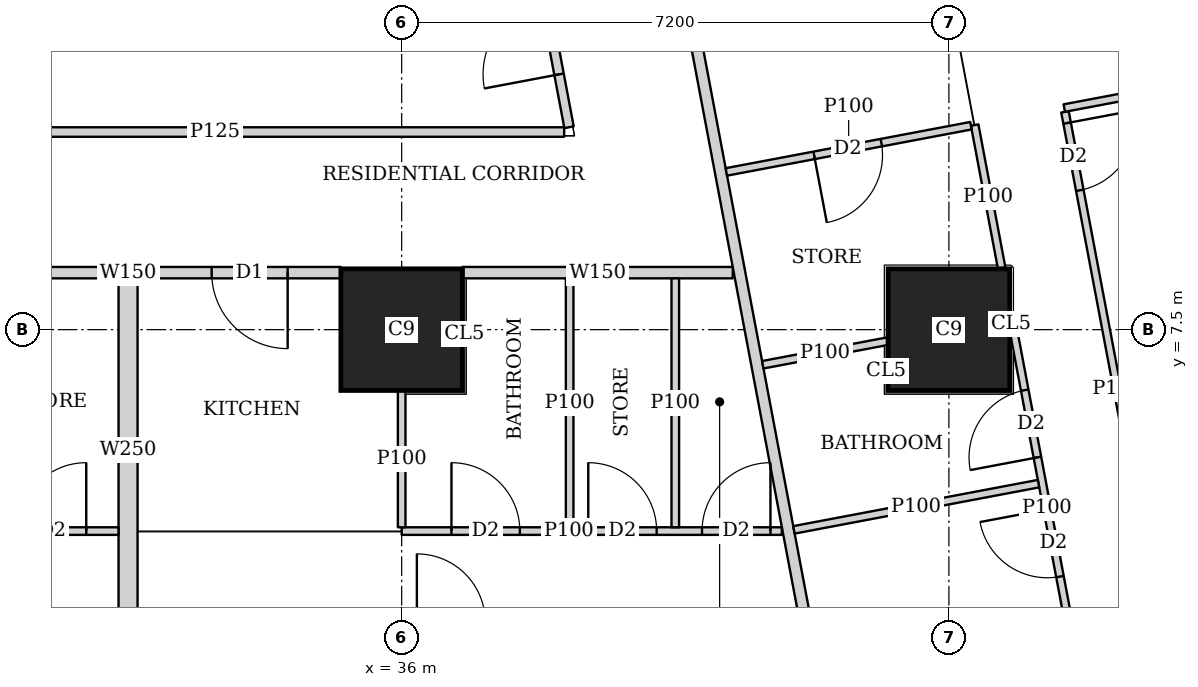
"""IFC4 building model, lengths in metres.
Left out: names, types, materials, properties, quantities, classifications, styles, units other than length and angle.
Written with IfcOpenShell. Run it as: python <this file> out.ifc"""

import sys

from ifc_helpers import new_model, si_unit, direction, frame, frame_2d, origin, origin_2d, place, context, subcontext, project, spatial, rectangle, extrude, element, fill, save


model = new_model("IFC4")
c1 = context("Model", 3, precision=1e-05, world=origin(), true_north=direction((0.0, 1.0)))
c2 = subcontext(c1, "Body", "Model", "MODEL_VIEW")
j1 = project(units=[si_unit("LENGTHUNIT", "METRE"), si_unit("PLANEANGLEUNIT", "RADIAN")], contexts=[c1])
p1 = place(None, origin())
s1 = spatial("IfcSite", under=j1, at=p1, CompositionType="ELEMENT")
p2 = place(p1, origin())
s2 = spatial("IfcBuilding", under=s1, at=p2, CompositionType="ELEMENT")
p3 = place(p2, frame((0.0, 0.0, 100.4)))
s3 = spatial("IfcBuildingStorey", under=s2, at=p3, CompositionType="ELEMENT", Elevation=100.4)
for number, where, z_axis, x_axis in (
    (1, (36.0, 7.5, 0.0), (0.0, 0.0, 1.0), (1.0, 0.0, 0.0)),
    (2, (43.2, 7.5, 0.0), (0.0, 0.0, 1.0), (1.0, 0.0, 0.0)),
):
    element("IfcColumn", number, at=place(p3, frame(where, z_axis=z_axis, x_axis=x_axis)), inside=s3, PredefinedType="COLUMN", context=c2, shape_type="SweptSolid", body=[
        extrude(rectangle(XDim=1.6, YDim=1.6, at=origin_2d()), origin(), (0.0, 0.0, 1.0), 3.75),
    ])
p4 = place(p3, frame((50.653, 2.703, 0.0), z_axis=(0.0, 0.0, 1.0), x_axis=(-0.185612026696, 0.982623109613, 0.0)))
e3 = element("IfcWall", 3, at=p4, inside=s3, PredefinedType="SOLIDWALL", context=c2, shape_type="SweptSolid", body=[
    extrude(rectangle(XDim=41.393, YDim=0.2, at=frame_2d((20.697, 0.0))), origin(), (0.0, 0.0, 1.0), 3.5),
])
p5 = place(p4, frame((1.633, 0.0, 0.9)))
e4 = element("IfcOpeningElement", 4, at=p5, cuts=e3, PredefinedType="OPENING", context=c2, shape_type="SweptSolid", body=[
    extrude(rectangle(XDim=1.8, YDim=1.5, at=frame_2d((0.9, 0.75))), frame((0.0, 0.11, 0.0), z_axis=(0.0, -1.0, 0.0), x_axis=(1.0, 0.0, 0.0)), (0.0, 0.0, 1.0), 0.22),
])
p6 = place(p4, frame((6.032, 0.0, 0.9)))
e5 = element("IfcOpeningElement", 5, at=p6, cuts=e3, PredefinedType="OPENING", context=c2, shape_type="SweptSolid", body=[
    extrude(rectangle(XDim=1.8, YDim=1.5, at=frame_2d((0.9, 0.75))), frame((0.0, 0.11, 0.0), z_axis=(0.0, -1.0, 0.0), x_axis=(1.0, 0.0, 0.0)), (0.0, 0.0, 1.0), 0.22),
])
p7 = place(p4, frame((9.848, 0.0, 0.9)))
e6 = element("IfcOpeningElement", 6, at=p7, cuts=e3, PredefinedType="OPENING", context=c2, shape_type="SweptSolid", body=[
    extrude(rectangle(XDim=1.8, YDim=1.5, at=frame_2d((0.9, 0.75))), frame((0.0, 0.11, 0.0), z_axis=(0.0, -1.0, 0.0), x_axis=(1.0, 0.0, 0.0)), (0.0, 0.0, 1.0), 0.22),
])
p8 = place(p4, frame((13.664, 0.0, 0.9)))
e7 = element("IfcOpeningElement", 7, at=p8, cuts=e3, PredefinedType="OPENING", context=c2, shape_type="SweptSolid", body=[
    extrude(rectangle(XDim=1.8, YDim=1.5, at=frame_2d((0.9, 0.75))), frame((0.0, 0.11, 0.0), z_axis=(0.0, -1.0, 0.0), x_axis=(1.0, 0.0, 0.0)), (0.0, 0.0, 1.0), 0.22),
])
p9 = place(p4, frame((17.481, 0.0, 0.9)))
e8 = element("IfcOpeningElement", 8, at=p9, cuts=e3, PredefinedType="OPENING", context=c2, shape_type="SweptSolid", body=[
    extrude(rectangle(XDim=1.8, YDim=1.5, at=frame_2d((0.9, 0.75))), frame((0.0, 0.11, 0.0), z_axis=(0.0, -1.0, 0.0), x_axis=(1.0, 0.0, 0.0)), (0.0, 0.0, 1.0), 0.22),
])
p10 = place(p4, frame((21.297, 0.0, 0.9)))
e9 = element("IfcOpeningElement", 9, at=p10, cuts=e3, PredefinedType="OPENING", context=c2, shape_type="SweptSolid", body=[
    extrude(rectangle(XDim=1.8, YDim=1.5, at=frame_2d((0.9, 0.75))), frame((0.0, 0.11, 0.0), z_axis=(0.0, -1.0, 0.0), x_axis=(1.0, 0.0, 0.0)), (0.0, 0.0, 1.0), 0.22),
])
p11 = place(p4, frame((25.113, 0.0, 0.9)))
e10 = element("IfcOpeningElement", 10, at=p11, cuts=e3, PredefinedType="OPENING", context=c2, shape_type="SweptSolid", body=[
    extrude(rectangle(XDim=1.8, YDim=1.5, at=frame_2d((0.9, 0.75))), frame((0.0, 0.11, 0.0), z_axis=(0.0, -1.0, 0.0), x_axis=(1.0, 0.0, 0.0)), (0.0, 0.0, 1.0), 0.22),
])
p12 = place(p4, frame((28.93, 0.0, 0.9)))
e11 = element("IfcOpeningElement", 11, at=p12, cuts=e3, PredefinedType="OPENING", context=c2, shape_type="SweptSolid", body=[
    extrude(rectangle(XDim=1.8, YDim=1.5, at=frame_2d((0.9, 0.75))), frame((0.0, 0.11, 0.0), z_axis=(0.0, -1.0, 0.0), x_axis=(1.0, 0.0, 0.0)), (0.0, 0.0, 1.0), 0.22),
])
p13 = place(p4, frame((32.746, 0.0, 0.9)))
e12 = element("IfcOpeningElement", 12, at=p13, cuts=e3, PredefinedType="OPENING", context=c2, shape_type="SweptSolid", body=[
    extrude(rectangle(XDim=1.8, YDim=1.5, at=frame_2d((0.9, 0.75))), frame((0.0, 0.11, 0.0), z_axis=(0.0, -1.0, 0.0), x_axis=(1.0, 0.0, 0.0)), (0.0, 0.0, 1.0), 0.22),
])
p14 = place(p4, frame((36.481, 0.0, 0.9)))
e13 = element("IfcOpeningElement", 13, at=p14, cuts=e3, PredefinedType="OPENING", context=c2, shape_type="SweptSolid", body=[
    extrude(rectangle(XDim=1.8, YDim=1.5, at=frame_2d((0.9, 0.75))), frame((0.0, 0.11, 0.0), z_axis=(0.0, -1.0, 0.0), x_axis=(1.0, 0.0, 0.0)), (0.0, 0.0, 1.0), 0.22),
])
p15 = place(p3, frame((40.356, 8.25, 0.0), z_axis=(0.0, 0.0, 1.0), x_axis=(-1.0, 0.0, 0.0)))
e14 = element("IfcWall", 14, at=p15, inside=s3, PredefinedType="SOLIDWALL", context=c2, shape_type="SweptSolid", body=[
    extrude(rectangle(XDim=3.555, YDim=0.15, at=frame_2d((1.777, 0.0))), origin(), (0.0, 0.0, 1.0), 3.5),
])
p16 = place(p3, frame((35.199, 8.25, 0.0), z_axis=(0.0, 0.0, 1.0), x_axis=(-1.0, 0.0, 0.0)))
e15 = element("IfcWall", 15, at=p16, inside=s3, PredefinedType="SOLIDWALL", context=c2, shape_type="SweptSolid", body=[
    extrude(rectangle(XDim=5.598, YDim=0.15, at=frame_2d((2.799, 0.0))), origin(), (0.0, 0.0, 1.0), 3.5),
])
p17 = place(p16, frame((0.699, 0.0, 0.0)))
e16 = element("IfcOpeningElement", 16, at=p17, cuts=e15, PredefinedType="OPENING", context=c2, shape_type="SweptSolid", body=[
    extrude(rectangle(XDim=1.0, YDim=2.1, at=frame_2d((0.5, 1.05))), frame((0.0, 0.085, 0.0), z_axis=(0.0, -1.0, 0.0), x_axis=(1.0, 0.0, 0.0)), (0.0, 0.0, 1.0), 0.17),
])
p18 = place(p3, frame((33.382, 45.65, 0.0), z_axis=(0.0, 0.0, 1.0), x_axis=(0.185593544777, -0.982626600565, 0.0)))
e17 = element("IfcWall", 17, at=p18, inside=s3, PredefinedType="SOLIDWALL", context=c2, shape_type="SweptSolid", body=[
    extrude(rectangle(XDim=47.118, YDim=0.15, at=frame_2d((23.559, 0.0))), origin(), (0.0, 0.0, 1.0), 2.2),
])
p19 = place(p18, frame((10.662, 0.0, 0.0)))
e18 = element("IfcOpeningElement", 18, at=p19, cuts=e17, PredefinedType="OPENING", context=c2, shape_type="SweptSolid", body=[
    extrude(rectangle(XDim=1.0, YDim=2.1, at=frame_2d((0.5, 1.05))), frame((0.0, 0.085, 0.0), z_axis=(0.0, -1.0, 0.0), x_axis=(1.0, 0.0, 0.0)), (0.0, 0.0, 1.0), 0.17),
])
p20 = place(p18, frame((15.237, 0.0, 0.0)))
e19 = element("IfcOpeningElement", 19, at=p20, cuts=e17, PredefinedType="OPENING", context=c2, shape_type="SweptSolid", body=[
    extrude(rectangle(XDim=1.0, YDim=2.1, at=frame_2d((0.5, 1.05))), frame((0.0, 0.085, 0.0), z_axis=(0.0, -1.0, 0.0), x_axis=(1.0, 0.0, 0.0)), (0.0, 0.0, 1.0), 0.17),
])
p21 = place(p18, frame((27.341, 0.0, 0.0)))
e20 = element("IfcOpeningElement", 20, at=p21, cuts=e17, PredefinedType="OPENING", context=c2, shape_type="SweptSolid", body=[
    extrude(rectangle(XDim=1.0, YDim=2.1, at=frame_2d((0.5, 1.05))), frame((0.0, 0.085, 0.0), z_axis=(0.0, -1.0, 0.0), x_axis=(1.0, 0.0, 0.0)), (0.0, 0.0, 1.0), 0.17),
])
p22 = place(p18, frame((33.833, 0.0, 0.0)))
e21 = element("IfcOpeningElement", 21, at=p22, cuts=e17, PredefinedType="OPENING", context=c2, shape_type="SweptSolid", body=[
    extrude(rectangle(XDim=1.0, YDim=2.1, at=frame_2d((0.5, 1.05))), frame((0.0, 0.085, 0.0), z_axis=(0.0, -1.0, 0.0), x_axis=(1.0, 0.0, 0.0)), (0.0, 0.0, 1.0), 0.17),
])
p23 = place(p3, frame((32.275, 4.85, 0.0), z_axis=(0.0, 0.0, 1.0), x_axis=(-1.0, 0.0, 0.0)))
e22 = element("IfcWall", 22, at=p23, inside=s3, PredefinedType="PARTITIONING", context=c2, shape_type="SweptSolid", body=[
    extrude(rectangle(XDim=7.075, YDim=0.1, at=frame_2d((3.538, 0.0))), origin(), (0.0, 0.0, 1.0), 3.5),
])
p24 = place(p23, frame((5.52, 0.0, 0.0)))
e23 = element("IfcOpeningElement", 23, at=p24, cuts=e22, PredefinedType="OPENING", context=c2, shape_type="SweptSolid", body=[
    extrude(rectangle(XDim=0.9, YDim=2.1, at=frame_2d((0.45, 1.05))), frame((0.0, 0.06, 0.0), z_axis=(0.0, -1.0, 0.0), x_axis=(1.0, 0.0, 0.0)), (0.0, 0.0, 1.0), 0.12),
])
p25 = place(p23, frame((2.225, 0.0, 0.0)))
e24 = element("IfcOpeningElement", 24, at=p25, cuts=e22, PredefinedType="OPENING", context=c2, shape_type="SweptSolid", body=[
    extrude(rectangle(XDim=0.9, YDim=2.1, at=frame_2d((0.45, 1.05))), frame((0.0, 0.06, 0.0), z_axis=(0.0, -1.0, 0.0), x_axis=(1.0, 0.0, 0.0)), (0.0, 0.0, 1.0), 0.12),
])
p26 = place(p23, frame((3.72, 0.0, 0.0)))
e25 = element("IfcOpeningElement", 25, at=p26, cuts=e22, PredefinedType="OPENING", context=c2, shape_type="SweptSolid", body=[
    extrude(rectangle(XDim=0.9, YDim=2.1, at=frame_2d((0.45, 1.05))), frame((0.0, 0.06, 0.0), z_axis=(0.0, -1.0, 0.0), x_axis=(1.0, 0.0, 0.0)), (0.0, 0.0, 1.0), 0.12),
])
p27 = place(p23, frame((0.425, 0.0, 0.0)))
e26 = element("IfcOpeningElement", 26, at=p27, cuts=e22, PredefinedType="OPENING", context=c2, shape_type="SweptSolid", body=[
    extrude(rectangle(XDim=0.9, YDim=2.1, at=frame_2d((0.45, 1.05))), frame((0.0, 0.06, 0.0), z_axis=(0.0, -1.0, 0.0), x_axis=(1.0, 0.0, 0.0)), (0.0, 0.0, 1.0), 0.12),
])
p28 = place(p3, frame((41.002, 4.85, 0.0), z_axis=(0.0, 0.0, 1.0), x_axis=(-1.0, 0.0, 0.0)))
e27 = element("IfcWall", 27, at=p28, inside=s3, PredefinedType="PARTITIONING", context=c2, shape_type="SweptSolid", body=[
    extrude(rectangle(XDim=5.002, YDim=0.1, at=frame_2d((2.501, 0.0))), origin(), (0.0, 0.0, 1.0), 3.5),
])
p29 = place(p28, frame((3.447, 0.0, 0.0)))
e28 = element("IfcOpeningElement", 28, at=p29, cuts=e27, PredefinedType="OPENING", context=c2, shape_type="SweptSolid", body=[
    extrude(rectangle(XDim=0.9, YDim=2.1, at=frame_2d((0.45, 1.05))), frame((0.0, 0.06, 0.0), z_axis=(0.0, -1.0, 0.0), x_axis=(1.0, 0.0, 0.0)), (0.0, 0.0, 1.0), 0.12),
])
p30 = place(p28, frame((0.15, 0.0, 0.0)))
e29 = element("IfcOpeningElement", 29, at=p30, cuts=e27, PredefinedType="OPENING", context=c2, shape_type="SweptSolid", body=[
    extrude(rectangle(XDim=0.9, YDim=2.1, at=frame_2d((0.45, 1.05))), frame((0.0, 0.06, 0.0), z_axis=(0.0, -1.0, 0.0), x_axis=(1.0, 0.0, 0.0)), (0.0, 0.0, 1.0), 0.12),
])
p31 = place(p28, frame((1.647, 0.0, 0.0)))
e30 = element("IfcOpeningElement", 30, at=p31, cuts=e27, PredefinedType="OPENING", context=c2, shape_type="SweptSolid", body=[
    extrude(rectangle(XDim=0.9, YDim=2.1, at=frame_2d((0.45, 1.05))), frame((0.0, 0.06, 0.0), z_axis=(0.0, -1.0, 0.0), x_axis=(1.0, 0.0, 0.0)), (0.0, 0.0, 1.0), 0.12),
])
p32 = place(p3, frame((36.0, 4.9, 0.0), z_axis=(0.0, 0.0, 1.0), x_axis=(0.0, 1.0, 0.0)))
e31 = element("IfcWall", 31, at=p32, inside=s3, PredefinedType="PARTITIONING", context=c2, shape_type="SweptSolid", body=[
    extrude(rectangle(XDim=1.799, YDim=0.1, at=frame_2d((0.899, 0.0))), origin(), (0.0, 0.0, 1.0), 3.5),
])
for number, where, z_axis, x_axis in (
    (32, (39.6, 4.9, 0.0), (0.0, 0.0, 1.0), (0.0, 1.0, 0.0)),
    (33, (38.21, 4.9, 0.0), (0.0, 0.0, 1.0), (0.0, 1.0, 0.0)),
):
    element("IfcWall", number, at=place(p3, frame(where, z_axis=z_axis, x_axis=x_axis)), inside=s3, PredefinedType="PARTITIONING", context=c2, shape_type="SweptSolid", body=[
        extrude(rectangle(XDim=3.275, YDim=0.1, at=frame_2d((1.638, 0.0))), origin(), (0.0, 0.0, 1.0), 3.5),
    ])
p33 = place(p3, frame((32.4, 3.65, 0.0), z_axis=(0.0, 0.0, 1.0), x_axis=(0.0, 1.0, 0.0)))
e34 = element("IfcWall", 34, at=p33, inside=s3, PredefinedType="SOLIDWALL", context=c2, shape_type="SweptSolid", body=[
    extrude(rectangle(XDim=4.525, YDim=0.25, at=frame_2d((2.263, 0.0))), origin(), (0.0, 0.0, 1.0), 3.5),
])
p34 = place(p3, frame((44.727, 10.366, 0.0), z_axis=(0.0, 0.0, 1.0), x_axis=(0.185678775129, -0.982610498858, 0.0)))
e35 = element("IfcWall", 35, at=p34, inside=s3, PredefinedType="PARTITIONING", context=c2, shape_type="SweptSolid", body=[
    extrude(rectangle(XDim=7.421, YDim=0.1, at=frame_2d((3.71, 0.0))), origin(), (0.0, 0.0, 1.0), 3.5),
])
p35 = place(p34, frame((0.151, 0.0, 0.0)))
e36 = element("IfcOpeningElement", 36, at=p35, cuts=e35, PredefinedType="OPENING", context=c2, shape_type="SweptSolid", body=[
    extrude(rectangle(XDim=0.9, YDim=2.1, at=frame_2d((0.45, 1.05))), frame((0.0, 0.06, 0.0), z_axis=(0.0, -1.0, 0.0), x_axis=(1.0, 0.0, 0.0)), (0.0, 0.0, 1.0), 0.12),
])
p36 = place(p34, frame((4.55, 0.0, 0.0)))
e37 = element("IfcOpeningElement", 37, at=p36, cuts=e35, PredefinedType="OPENING", context=c2, shape_type="SweptSolid", body=[
    extrude(rectangle(XDim=0.9, YDim=2.1, at=frame_2d((0.45, 1.05))), frame((0.0, 0.06, 0.0), z_axis=(0.0, -1.0, 0.0), x_axis=(1.0, 0.0, 0.0)), (0.0, 0.0, 1.0), 0.12),
])
p37 = place(p3, frame((43.539, 10.192, 0.0), z_axis=(0.0, 0.0, 1.0), x_axis=(0.185366049966, -0.982669541362, 0.0)))
e38 = element("IfcWall", 38, at=p37, inside=s3, PredefinedType="PARTITIONING", context=c2, shape_type="SweptSolid", body=[
    extrude(rectangle(XDim=1.915, YDim=0.1, at=frame_2d((0.958, 0.0))), origin(), (0.0, 0.0, 1.0), 3.5),
])
p38 = place(p3, frame((44.049, 7.49, 0.0), z_axis=(0.0, 0.0, 1.0), x_axis=(0.185666332607, -0.982612849975, 0.0)))
e39 = element("IfcWall", 39, at=p38, inside=s3, PredefinedType="PARTITIONING", context=c2, shape_type="SweptSolid", body=[
    extrude(rectangle(XDim=4.75, YDim=0.1, at=frame_2d((2.375, 0.0))), origin(), (0.0, 0.0, 1.0), 3.5),
])
p39 = place(p38, frame((0.8, 0.0, 0.0)))
e40 = element("IfcOpeningElement", 40, at=p39, cuts=e39, PredefinedType="OPENING", context=c2, shape_type="SweptSolid", body=[
    extrude(rectangle(XDim=0.9, YDim=2.1, at=frame_2d((0.45, 1.05))), frame((0.0, 0.06, 0.0), z_axis=(0.0, -1.0, 0.0), x_axis=(1.0, 0.0, 0.0)), (0.0, 0.0, 1.0), 0.12),
])
p40 = place(p38, frame((2.396, 0.0, 0.0)))
e41 = element("IfcOpeningElement", 41, at=p40, cuts=e39, PredefinedType="OPENING", context=c2, shape_type="SweptSolid", body=[
    extrude(rectangle(XDim=0.9, YDim=2.1, at=frame_2d((0.45, 1.05))), frame((0.0, 0.06, 0.0), z_axis=(0.0, -1.0, 0.0), x_axis=(1.0, 0.0, 0.0)), (0.0, 0.0, 1.0), 0.12),
])
p41 = place(p3, frame((48.943, 11.213, 0.0), z_axis=(0.0, 0.0, 1.0), x_axis=(-0.982633535512, -0.185556823879, 0.0)))
e42 = element("IfcWall", 42, at=p41, inside=s3, PredefinedType="PARTITIONING", context=c2, shape_type="SweptSolid", body=[
    extrude(rectangle(XDim=4.3, YDim=0.1, at=frame_2d((2.15, 0.0))), origin(), (0.0, 0.0, 1.0), 2.2),
])
p42 = place(p3, frame((43.49, 10.183, 0.0), z_axis=(0.0, 0.0, 1.0), x_axis=(-0.982607026909, -0.185697147715, 0.0)))
e43 = element("IfcWall", 43, at=p42, inside=s3, PredefinedType="PARTITIONING", context=c2, shape_type="SweptSolid", body=[
    extrude(rectangle(XDim=3.275, YDim=0.1, at=frame_2d((1.637, 0.0))), origin(), (0.0, 0.0, 1.0), 3.5),
])
p43 = place(p42, frame((1.2, 0.0, 0.0)))
e44 = element("IfcOpeningElement", 44, at=p43, cuts=e43, PredefinedType="OPENING", context=c2, shape_type="SweptSolid", body=[
    extrude(rectangle(XDim=0.9, YDim=2.1, at=frame_2d((0.45, 1.05))), frame((0.0, 0.06, 0.0), z_axis=(0.0, -1.0, 0.0), x_axis=(1.0, 0.0, 0.0)), (0.0, 0.0, 1.0), 0.12),
])
p44 = place(p3, frame((42.39, 7.348, 0.0), z_axis=(0.0, 0.0, 1.0), x_axis=(-0.9825976927, -0.185746532405, 0.0)))
e45 = element("IfcWall", 45, at=p44, inside=s3, PredefinedType="PARTITIONING", context=c2, shape_type="SweptSolid", body=[
    extrude(rectangle(XDim=1.668, YDim=0.1, at=frame_2d((0.834, 0.0))), origin(), (0.0, 0.0, 1.0), 3.5),
])
p45 = place(p3, frame((44.379, 5.474, 0.0), z_axis=(0.0, 0.0, 1.0), x_axis=(-0.982607026909, -0.185697147715, 0.0)))
e46 = element("IfcWall", 46, at=p45, inside=s3, PredefinedType="PARTITIONING", context=c2, shape_type="SweptSolid", body=[
    extrude(rectangle(XDim=3.275, YDim=0.1, at=frame_2d((1.637, 0.0))), origin(), (0.0, 0.0, 1.0), 3.5),
])
p46 = place(p3, frame((28.95, 10.1, 0.0), z_axis=(0.0, 0.0, 1.0), x_axis=(1.0, 0.0, 0.0)))
e47 = element("IfcWall", 47, at=p46, inside=s3, PredefinedType="PARTITIONING", context=c2, shape_type="SweptSolid", body=[
    extrude(rectangle(XDim=9.188, YDim=0.125, at=frame_2d((4.594, 0.0))), origin(), (0.0, 0.0, 1.0), 3.5),
])
p47 = place(p3, frame((38.202, 10.163, 0.0), z_axis=(0.0, 0.0, 1.0), x_axis=(-0.185610321132, 0.982623431783, 0.0)))
e48 = element("IfcWall", 48, at=p47, inside=s3, PredefinedType="PARTITIONING", context=c2, shape_type="SweptSolid", body=[
    extrude(rectangle(XDim=25.111, YDim=0.125, at=frame_2d((12.556, 0.0))), origin(), (0.0, 0.0, 1.0), 2.5),
])
p48 = place(p47, frame((0.708, 0.0, 0.0)))
e49 = element("IfcOpeningElement", 49, at=p48, cuts=e48, PredefinedType="OPENING", context=c2, shape_type="SweptSolid", body=[
    extrude(rectangle(XDim=1.0, YDim=2.1, at=frame_2d((0.5, 1.05))), frame((0.0, 0.073, 0.0), z_axis=(0.0, -1.0, 0.0), x_axis=(1.0, 0.0, 0.0)), (0.0, 0.0, 1.0), 0.145),
])
p49 = place(p47, frame((6.0, 0.0, 0.0)))
e50 = element("IfcOpeningElement", 50, at=p49, cuts=e48, PredefinedType="OPENING", context=c2, shape_type="SweptSolid", body=[
    extrude(rectangle(XDim=1.0, YDim=2.1, at=frame_2d((0.5, 1.05))), frame((0.0, 0.073, 0.0), z_axis=(0.0, -1.0, 0.0), x_axis=(1.0, 0.0, 0.0)), (0.0, 0.0, 1.0), 0.145),
])
p50 = place(p47, frame((13.378, 0.0, 0.0)))
e51 = element("IfcOpeningElement", 51, at=p50, cuts=e48, PredefinedType="OPENING", context=c2, shape_type="SweptSolid", body=[
    extrude(rectangle(XDim=1.0, YDim=2.1, at=frame_2d((0.5, 1.05))), frame((0.0, 0.073, 0.0), z_axis=(0.0, -1.0, 0.0), x_axis=(1.0, 0.0, 0.0)), (0.0, 0.0, 1.0), 0.145),
])
p51 = place(p47, frame((21.25, 0.0, 0.0)))
e52 = element("IfcOpeningElement", 52, at=p51, cuts=e48, PredefinedType="OPENING", context=c2, shape_type="SweptSolid", body=[
    extrude(rectangle(XDim=1.0, YDim=2.1, at=frame_2d((0.5, 1.05))), frame((0.0, 0.073, 0.0), z_axis=(0.0, -1.0, 0.0), x_axis=(1.0, 0.0, 0.0)), (0.0, 0.0, 1.0), 0.145),
])
p52 = place(p27, origin())
e53 = element("IfcDoor", 53, at=p52, inside=s3, OperationType="SINGLE_SWING_RIGHT", PredefinedType="DOOR", context=c2, shape_type="SweptSolid", body=[
    extrude(rectangle(XDim=0.9, YDim=2.1, at=frame_2d((0.45, 1.05))), frame((0.0, 0.025, 0.0), z_axis=(0.0, -1.0, 0.0), x_axis=(1.0, 0.0, 0.0)), (0.0, 0.0, 1.0), 0.05),
])
fill(e26, e53)
p53 = place(p29, origin())
e54 = element("IfcDoor", 54, at=p53, inside=s3, OperationType="SINGLE_SWING_LEFT", PredefinedType="DOOR", context=c2, shape_type="SweptSolid", body=[
    extrude(rectangle(XDim=0.9, YDim=2.1, at=frame_2d((0.45, 1.05))), frame((0.0, 0.025, 0.0), z_axis=(0.0, -1.0, 0.0), x_axis=(1.0, 0.0, 0.0)), (0.0, 0.0, 1.0), 0.05),
])
fill(e28, e54)
p54 = place(p30, origin())
e55 = element("IfcDoor", 55, at=p54, inside=s3, OperationType="SINGLE_SWING_RIGHT", PredefinedType="DOOR", context=c2, shape_type="SweptSolid", body=[
    extrude(rectangle(XDim=0.9, YDim=2.1, at=frame_2d((0.45, 1.05))), frame((0.0, 0.025, 0.0), z_axis=(0.0, -1.0, 0.0), x_axis=(1.0, 0.0, 0.0)), (0.0, 0.0, 1.0), 0.05),
])
fill(e29, e55)
p55 = place(p31, origin())
e56 = element("IfcDoor", 56, at=p55, inside=s3, OperationType="SINGLE_SWING_LEFT", PredefinedType="DOOR", context=c2, shape_type="SweptSolid", body=[
    extrude(rectangle(XDim=0.9, YDim=2.1, at=frame_2d((0.45, 1.05))), frame((0.0, 0.025, 0.0), z_axis=(0.0, -1.0, 0.0), x_axis=(1.0, 0.0, 0.0)), (0.0, 0.0, 1.0), 0.05),
])
fill(e30, e56)
p56 = place(p17, origin())
e57 = element("IfcDoor", 57, at=p56, inside=s3, OperationType="SINGLE_SWING_LEFT", PredefinedType="DOOR", context=c2, shape_type="SweptSolid", body=[
    extrude(rectangle(XDim=1.0, YDim=2.1, at=frame_2d((0.5, 1.05))), frame((0.0, 0.025, 0.0), z_axis=(0.0, -1.0, 0.0), x_axis=(1.0, 0.0, 0.0)), (0.0, 0.0, 1.0), 0.05),
])
fill(e16, e57)
p57 = place(p35, origin())
e58 = element("IfcDoor", 58, at=p57, inside=s3, OperationType="SINGLE_SWING_LEFT", PredefinedType="DOOR", context=c2, shape_type="SweptSolid", body=[
    extrude(rectangle(XDim=0.9, YDim=2.1, at=frame_2d((0.45, 1.05))), frame((0.0, 0.025, 0.0), z_axis=(0.0, -1.0, 0.0), x_axis=(1.0, 0.0, 0.0)), (0.0, 0.0, 1.0), 0.05),
])
fill(e36, e58)
p58 = place(p39, origin())
e59 = element("IfcDoor", 59, at=p58, inside=s3, OperationType="SINGLE_SWING_LEFT", PredefinedType="DOOR", context=c2, shape_type="SweptSolid", body=[
    extrude(rectangle(XDim=0.9, YDim=2.1, at=frame_2d((0.45, 1.05))), frame((0.0, 0.025, 0.0), z_axis=(0.0, -1.0, 0.0), x_axis=(1.0, 0.0, 0.0)), (0.0, 0.0, 1.0), 0.05),
])
fill(e40, e59)
p59 = place(p40, origin())
e60 = element("IfcDoor", 60, at=p59, inside=s3, OperationType="SINGLE_SWING_RIGHT", PredefinedType="DOOR", context=c2, shape_type="SweptSolid", body=[
    extrude(rectangle(XDim=0.9, YDim=2.1, at=frame_2d((0.45, 1.05))), frame((0.0, 0.025, 0.0), z_axis=(0.0, -1.0, 0.0), x_axis=(1.0, 0.0, 0.0)), (0.0, 0.0, 1.0), 0.05),
])
fill(e41, e60)
p60 = place(p43, origin())
e61 = element("IfcDoor", 61, at=p60, inside=s3, OperationType="SINGLE_SWING_RIGHT", PredefinedType="DOOR", context=c2, shape_type="SweptSolid", body=[
    extrude(rectangle(XDim=0.9, YDim=2.1, at=frame_2d((0.45, 1.05))), frame((0.0, 0.025, 0.0), z_axis=(0.0, -1.0, 0.0), x_axis=(1.0, 0.0, 0.0)), (0.0, 0.0, 1.0), 0.05),
])
fill(e44, e61)
p61 = place(p48, origin())
e62 = element("IfcDoor", 62, at=p61, inside=s3, OperationType="SINGLE_SWING_LEFT", PredefinedType="DOOR", context=c2, shape_type="SweptSolid", body=[
    extrude(rectangle(XDim=1.0, YDim=2.1, at=frame_2d((0.5, 1.05))), frame((0.0, 0.025, 0.0), z_axis=(0.0, -1.0, 0.0), x_axis=(1.0, 0.0, 0.0)), (0.0, 0.0, 1.0), 0.05),
])
fill(e49, e62)
save(model, sys.argv[1])
